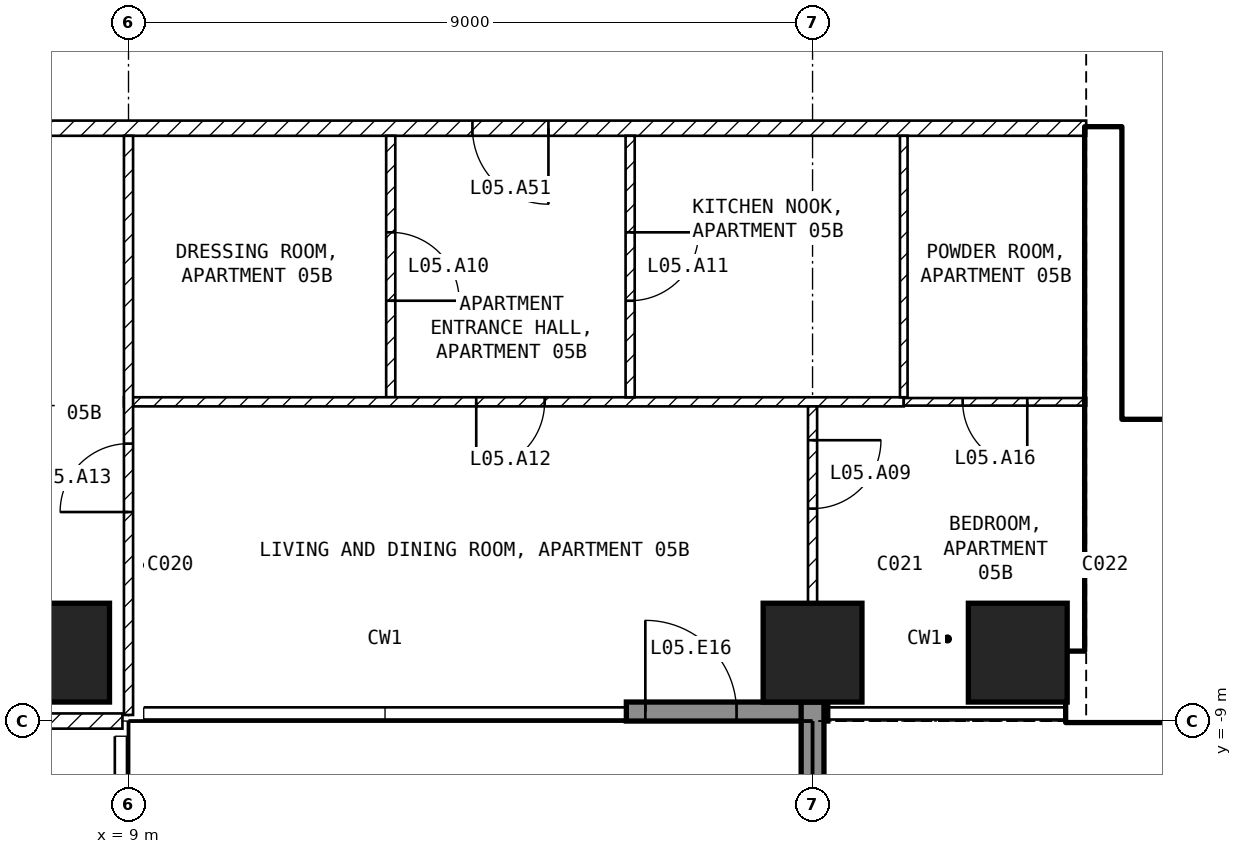
"""IFC4 building model, lengths in metres.
Left out: names, types, materials, properties, quantities, classifications, styles, units other than length and angle.
Written with IfcOpenShell. Run it as: python <this file> out.ifc"""

import sys

from ifc_helpers import new_model, si_unit, direction, frame, frame_2d, origin, origin_2d, place, context, subcontext, project, spatial, rectangle, extrude, element, fill, save


model = new_model("IFC4")
c1 = context("Model", 3, precision=1e-05, world=origin(), true_north=direction((0.0, 1.0)))
c2 = subcontext(c1, "Body", "Model", "MODEL_VIEW")
j1 = project(units=[si_unit("LENGTHUNIT", "METRE"), si_unit("PLANEANGLEUNIT", "RADIAN")], contexts=[c1])
p1 = place(None, origin())
s1 = spatial("IfcSite", under=j1, at=p1, CompositionType="ELEMENT")
p2 = place(p1, origin())
s2 = spatial("IfcBuilding", under=s1, at=p2, CompositionType="ELEMENT")
p3 = place(p2, frame((0.0, 0.0, 36.5)))
s3 = spatial("IfcBuildingStorey", under=s2, at=p3, CompositionType="ELEMENT", Elevation=36.5)
for number, where, z_axis, x_axis in (
    (1, (8.1, -8.1, -0.25), (0.0, 0.0, 1.0), (1.0, 0.0, 0.0)),
    (2, (18.0, -8.1, -0.25), (0.0, 0.0, 1.0), (1.0, 0.0, 0.0)),
    (3, (20.7, -8.1, -0.25), (0.0, 0.0, 1.0), (1.0, 0.0, 0.0)),
):
    element("IfcColumn", number, at=place(p3, frame(where, z_axis=z_axis, x_axis=x_axis)), inside=s3, PredefinedType="COLUMN", context=c2, shape_type="SweptSolid", body=[
        extrude(rectangle(XDim=1.3, YDim=1.3, at=origin_2d()), origin(), (0.0, 0.0, 1.0), 3.5),
    ])
p4 = place(p3, frame((15.55, -8.875, 0.0), z_axis=(0.0, 0.0, 1.0), x_axis=(1.0, 0.0, 0.0)))
e4 = element("IfcWall", 4, at=p4, inside=s3, PredefinedType="SOLIDWALL", context=c2, shape_type="SweptSolid", body=[
    extrude(rectangle(XDim=2.65, YDim=0.25, at=frame_2d((1.325, 0.0))), origin(), (0.0, 0.0, 1.0), 3.25),
])
p5 = place(p4, frame((0.25, 0.0, 0.0)))
e5 = element("IfcOpeningElement", 5, at=p5, cuts=e4, PredefinedType="OPENING", context=c2, shape_type="SweptSolid", body=[
    extrude(rectangle(XDim=1.2, YDim=2.4, at=frame_2d((0.6, 1.2))), frame((0.0, 0.135, 0.0), z_axis=(0.0, -1.0, 0.0), x_axis=(1.0, 0.0, 0.0)), (0.0, 0.0, 1.0), 0.27),
])
p6 = place(p3, frame((18.0, -8.75, 0.0), z_axis=(0.0, 0.0, 1.0), x_axis=(0.0, -1.0, 0.0)))
e6 = element("IfcWall", 6, at=p6, inside=s3, PredefinedType="SOLIDWALL", context=c2, shape_type="SweptSolid", body=[
    extrude(rectangle(XDim=2.95, YDim=0.3, at=frame_2d((1.475, 0.0))), origin(), (0.0, 0.0, 1.0), 3.25),
])
p7 = place(p3, frame((21.35, -8.55, 0.0), z_axis=(0.0, 0.0, 1.0), x_axis=(1.0, 0.0, 0.0)))
e7 = element("IfcWall", 7, at=p7, inside=s3, PredefinedType="SHEAR", context=c2, shape_type="SweptSolid", body=[
    extrude(rectangle(XDim=11.05, YDim=0.9, at=frame_2d((5.525, 0.0))), origin(), (0.0, 0.0, 1.0), 3.25),
])
p8 = place(p3, frame((21.825, -8.1, 0.0), z_axis=(0.0, 0.0, 1.0), x_axis=(0.0, 1.0, 0.0)))
e8 = element("IfcWall", 8, at=p8, inside=s3, PredefinedType="SHEAR", context=c2, shape_type="SweptSolid", body=[
    extrude(rectangle(XDim=6.9, YDim=0.45, at=frame_2d((3.45, 0.0))), origin(), (0.0, 0.0, 1.0), 3.25),
])
p9 = place(p3, frame((22.05, -5.15, 0.0), z_axis=(0.0, 0.0, 1.0), x_axis=(1.0, 0.0, 0.0)))
e9 = element("IfcWall", 9, at=p9, inside=s3, PredefinedType="SOLIDWALL", context=c2, shape_type="SweptSolid", body=[
    extrude(rectangle(XDim=6.3, YDim=0.2, at=frame_2d((3.15, 0.0))), origin(), (0.0, 0.0, 1.0), 3.25),
])
p10 = place(p9, frame((0.2, 0.0, 0.0)))
e10 = element("IfcOpeningElement", 10, at=p10, cuts=e9, PredefinedType="OPENING", context=c2, shape_type="SweptSolid", body=[
    extrude(rectangle(XDim=1.0, YDim=2.1, at=frame_2d((0.5, 1.05))), frame((0.0, 0.11, 0.0), z_axis=(0.0, -1.0, 0.0), x_axis=(1.0, 0.0, 0.0)), (0.0, 0.0, 1.0), 0.22),
])
p11 = place(p3, frame((21.6, -1.2, 0.0), z_axis=(0.0, 0.0, 1.0), x_axis=(-1.0, 0.0, 0.0)))
e11 = element("IfcWall", 11, at=p11, inside=s3, PredefinedType="PARTITIONING", context=c2, shape_type="SweptSolid", body=[
    extrude(rectangle(XDim=20.5, YDim=0.2, at=frame_2d((10.25, 0.0))), origin(), (0.0, 0.0, 1.0), 3.25),
])
p12 = place(p11, frame((7.075, 0.0, 0.0)))
e12 = element("IfcOpeningElement", 12, at=p12, cuts=e11, PredefinedType="OPENING", context=c2, shape_type="SweptSolid", body=[
    extrude(rectangle(XDim=1.0, YDim=2.1, at=frame_2d((0.5, 1.05))), frame((0.0, 0.11, 0.0), z_axis=(0.0, -1.0, 0.0), x_axis=(1.0, 0.0, 0.0)), (0.0, 0.0, 1.0), 0.22),
])
p13 = place(p3, frame((8.92, -9.0, 0.0), z_axis=(0.0, 0.0, 1.0), x_axis=(-1.0, 0.0, 0.0)))
e13 = element("IfcWall", 13, at=p13, inside=s3, PredefinedType="PARTITIONING", context=c2, shape_type="SweptSolid", body=[
    extrude(rectangle(XDim=17.84, YDim=0.2, at=frame_2d((8.92, 0.0))), origin(), (0.0, 0.0, 1.0), 3.25),
])
p14 = place(p13, frame((8.42, 0.0, 0.0)))
e14 = element("IfcOpeningElement", 14, at=p14, cuts=e13, PredefinedType="OPENING", context=c2, shape_type="SweptSolid", body=[
    extrude(rectangle(XDim=1.0, YDim=2.1, at=frame_2d((0.5, 1.05))), frame((0.0, 0.11, 0.0), z_axis=(0.0, -1.0, 0.0), x_axis=(1.0, 0.0, 0.0)), (0.0, 0.0, 1.0), 0.22),
])
p15 = place(p3, frame((12.45, -1.3, 0.0), z_axis=(0.0, 0.0, 1.0), x_axis=(0.0, -1.0, 0.0)))
e15 = element("IfcWall", 15, at=p15, inside=s3, PredefinedType="PARTITIONING", context=c2, shape_type="SweptSolid", body=[
    extrude(rectangle(XDim=3.44, YDim=0.12, at=frame_2d((1.72, 0.0))), origin(), (0.0, 0.0, 1.0), 3.25),
])
p16 = place(p15, frame((1.27, 0.0, 0.0)))
e16 = element("IfcOpeningElement", 16, at=p16, cuts=e15, PredefinedType="OPENING", context=c2, shape_type="SweptSolid", body=[
    extrude(rectangle(XDim=0.9, YDim=2.1, at=frame_2d((0.45, 1.05))), frame((0.0, 0.07, 0.0), z_axis=(0.0, -1.0, 0.0), x_axis=(1.0, 0.0, 0.0)), (0.0, 0.0, 1.0), 0.14),
])
p17 = place(p3, frame((19.2, -4.8, 0.0), z_axis=(0.0, 0.0, 1.0), x_axis=(-1.0, 0.0, 0.0)))
e17 = element("IfcWall", 17, at=p17, inside=s3, PredefinedType="PARTITIONING", context=c2, shape_type="SweptSolid", body=[
    extrude(rectangle(XDim=10.26, YDim=0.12, at=frame_2d((5.13, 0.0))), origin(), (0.0, 0.0, 1.0), 3.25),
])
p18 = place(p17, frame((4.725, 0.0, 0.0)))
e18 = element("IfcOpeningElement", 18, at=p18, cuts=e17, PredefinedType="OPENING", context=c2, shape_type="SweptSolid", body=[
    extrude(rectangle(XDim=0.9, YDim=2.1, at=frame_2d((0.45, 1.05))), frame((0.0, 0.07, 0.0), z_axis=(0.0, -1.0, 0.0), x_axis=(1.0, 0.0, 0.0)), (0.0, 0.0, 1.0), 0.14),
])
p19 = place(p3, frame((9.0, -8.92, 0.0), z_axis=(0.0, 0.0, 1.0), x_axis=(0.0, 1.0, 0.0)))
e19 = element("IfcWall", 19, at=p19, inside=s3, PredefinedType="PARTITIONING", context=c2, shape_type="SweptSolid", body=[
    extrude(rectangle(XDim=7.62, YDim=0.12, at=frame_2d((3.81, 0.0))), origin(), (0.0, 0.0, 1.0), 3.25),
])
p20 = place(p19, frame((2.67, 0.0, 0.0)))
e20 = element("IfcOpeningElement", 20, at=p20, cuts=e19, PredefinedType="OPENING", context=c2, shape_type="SweptSolid", body=[
    extrude(rectangle(XDim=0.9, YDim=2.1, at=frame_2d((0.45, 1.05))), frame((0.0, 0.07, 0.0), z_axis=(0.0, -1.0, 0.0), x_axis=(1.0, 0.0, 0.0)), (0.0, 0.0, 1.0), 0.14),
])
p21 = place(p3, frame((15.6, -1.3, 0.0), z_axis=(0.0, 0.0, 1.0), x_axis=(0.0, -1.0, 0.0)))
e21 = element("IfcWall", 21, at=p21, inside=s3, PredefinedType="PARTITIONING", context=c2, shape_type="SweptSolid", body=[
    extrude(rectangle(XDim=3.44, YDim=0.12, at=frame_2d((1.72, 0.0))), origin(), (0.0, 0.0, 1.0), 3.25),
])
p22 = place(p21, frame((1.27, 0.0, 0.0)))
e22 = element("IfcOpeningElement", 22, at=p22, cuts=e21, PredefinedType="OPENING", context=c2, shape_type="SweptSolid", body=[
    extrude(rectangle(XDim=0.9, YDim=2.1, at=frame_2d((0.45, 1.05))), frame((0.0, 0.07, 0.0), z_axis=(0.0, -1.0, 0.0), x_axis=(1.0, 0.0, 0.0)), (0.0, 0.0, 1.0), 0.14),
])
p23 = place(p3, frame((19.2, -1.3, 0.0), z_axis=(0.0, 0.0, 1.0), x_axis=(0.0, -1.0, 0.0)))
e23 = element("IfcWall", 23, at=p23, inside=s3, PredefinedType="PARTITIONING", context=c2, shape_type="SweptSolid", body=[
    extrude(rectangle(XDim=3.44, YDim=0.1, at=frame_2d((1.72, 0.0))), origin(), (0.0, 0.0, 1.0), 3.25),
])
p24 = place(p3, frame((21.6, -4.8, 0.0), z_axis=(0.0, 0.0, 1.0), x_axis=(-1.0, 0.0, 0.0)))
e24 = element("IfcWall", 24, at=p24, inside=s3, PredefinedType="PARTITIONING", context=c2, shape_type="SweptSolid", body=[
    extrude(rectangle(XDim=2.4, YDim=0.1, at=frame_2d((1.2, 0.0))), origin(), (0.0, 0.0, 1.0), 3.25),
])
p25 = place(p24, frame((0.775, 0.0, 0.0)))
e25 = element("IfcOpeningElement", 25, at=p25, cuts=e24, PredefinedType="OPENING", context=c2, shape_type="SweptSolid", body=[
    extrude(rectangle(XDim=0.85, YDim=2.1, at=frame_2d((0.425, 1.05))), frame((0.0, 0.06, 0.0), z_axis=(0.0, -1.0, 0.0), x_axis=(1.0, 0.0, 0.0)), (0.0, 0.0, 1.0), 0.12),
])
p26 = place(p3, frame((18.0, -4.86, 0.0), z_axis=(0.0, 0.0, 1.0), x_axis=(0.0, -1.0, 0.0)))
e26 = element("IfcWall", 26, at=p26, inside=s3, PredefinedType="PARTITIONING", context=c2, shape_type="SweptSolid", body=[
    extrude(rectangle(XDim=2.59, YDim=0.12, at=frame_2d((1.295, 0.0))), origin(), (0.0, 0.0, 1.0), 2.346),
])
p27 = place(p26, frame((0.445, 0.0, 0.0)))
e27 = element("IfcOpeningElement", 27, at=p27, cuts=e26, PredefinedType="OPENING", context=c2, shape_type="SweptSolid", body=[
    extrude(rectangle(XDim=0.9, YDim=2.1, at=frame_2d((0.45, 1.05))), frame((0.0, 0.07, 0.0), z_axis=(0.0, -1.0, 0.0), x_axis=(1.0, 0.0, 0.0)), (0.0, 0.0, 1.0), 0.14),
])
p28 = place(p5, origin())
e28 = element("IfcDoor", 28, at=p28, inside=s3, OperationType="SINGLE_SWING_LEFT", PredefinedType="DOOR", context=c2, shape_type="SweptSolid", body=[
    extrude(rectangle(XDim=1.2, YDim=2.4, at=frame_2d((0.6, 1.2))), frame((0.0, 0.025, 0.0), z_axis=(0.0, -1.0, 0.0), x_axis=(1.0, 0.0, 0.0)), (0.0, 0.0, 1.0), 0.05),
])
fill(e5, e28)
p29 = place(p10, origin())
e29 = element("IfcDoor", 29, at=p29, inside=s3, OperationType="SINGLE_SWING_LEFT", PredefinedType="DOOR", context=c2, shape_type="SweptSolid", body=[
    extrude(rectangle(XDim=1.0, YDim=2.1, at=frame_2d((0.5, 1.05))), frame((0.0, 0.025, 0.0), z_axis=(0.0, -1.0, 0.0), x_axis=(1.0, 0.0, 0.0)), (0.0, 0.0, 1.0), 0.05),
])
fill(e10, e29)
p30 = place(p27, origin())
e30 = element("IfcDoor", 30, at=p30, inside=s3, OperationType="SINGLE_SWING_LEFT", PredefinedType="DOOR", context=c2, shape_type="SweptSolid", body=[
    extrude(rectangle(XDim=0.9, YDim=2.1, at=frame_2d((0.45, 1.05))), frame((0.0, 0.025, 0.0), z_axis=(0.0, -1.0, 0.0), x_axis=(1.0, 0.0, 0.0)), (0.0, 0.0, 1.0), 0.05),
])
fill(e27, e30)
p31 = place(p16, origin())
e31 = element("IfcDoor", 31, at=p31, inside=s3, OperationType="SINGLE_SWING_RIGHT", PredefinedType="DOOR", context=c2, shape_type="SweptSolid", body=[
    extrude(rectangle(XDim=0.9, YDim=2.1, at=frame_2d((0.45, 1.05))), frame((0.0, 0.025, 0.0), z_axis=(0.0, -1.0, 0.0), x_axis=(1.0, 0.0, 0.0)), (0.0, 0.0, 1.0), 0.05),
])
fill(e16, e31)
p32 = place(p22, origin())
e32 = element("IfcDoor", 32, at=p32, inside=s3, OperationType="SINGLE_SWING_LEFT", PredefinedType="DOOR", context=c2, shape_type="SweptSolid", body=[
    extrude(rectangle(XDim=0.9, YDim=2.1, at=frame_2d((0.45, 1.05))), frame((0.0, 0.025, 0.0), z_axis=(0.0, -1.0, 0.0), x_axis=(1.0, 0.0, 0.0)), (0.0, 0.0, 1.0), 0.05),
])
fill(e22, e32)
p33 = place(p18, origin())
e33 = element("IfcDoor", 33, at=p33, inside=s3, OperationType="SINGLE_SWING_RIGHT", PredefinedType="DOOR", context=c2, shape_type="SweptSolid", body=[
    extrude(rectangle(XDim=0.9, YDim=2.1, at=frame_2d((0.45, 1.05))), frame((0.0, 0.025, 0.0), z_axis=(0.0, -1.0, 0.0), x_axis=(1.0, 0.0, 0.0)), (0.0, 0.0, 1.0), 0.05),
])
fill(e18, e33)
p34 = place(p20, origin())
e34 = element("IfcDoor", 34, at=p34, inside=s3, OperationType="SINGLE_SWING_LEFT", PredefinedType="DOOR", context=c2, shape_type="SweptSolid", body=[
    extrude(rectangle(XDim=0.9, YDim=2.1, at=frame_2d((0.45, 1.05))), frame((0.0, 0.025, 0.0), z_axis=(0.0, -1.0, 0.0), x_axis=(1.0, 0.0, 0.0)), (0.0, 0.0, 1.0), 0.05),
])
fill(e20, e34)
p35 = place(p25, origin())
e35 = element("IfcDoor", 35, at=p35, inside=s3, OperationType="SINGLE_SWING_LEFT", PredefinedType="DOOR", context=c2, shape_type="SweptSolid", body=[
    extrude(rectangle(XDim=0.85, YDim=2.1, at=frame_2d((0.425, 1.05))), frame((0.0, 0.025, 0.0), z_axis=(0.0, -1.0, 0.0), x_axis=(1.0, 0.0, 0.0)), (0.0, 0.0, 1.0), 0.05),
])
fill(e25, e35)
p36 = place(p12, origin())
e36 = element("IfcDoor", 36, at=p36, inside=s3, OperationType="SINGLE_SWING_LEFT", PredefinedType="DOOR", context=c2, shape_type="SweptSolid", body=[
    extrude(rectangle(XDim=1.0, YDim=2.1, at=frame_2d((0.5, 1.05))), frame((0.0, 0.025, 0.0), z_axis=(0.0, -1.0, 0.0), x_axis=(1.0, 0.0, 0.0)), (0.0, 0.0, 1.0), 0.05),
])
fill(e12, e36)
save(model, sys.argv[1])
